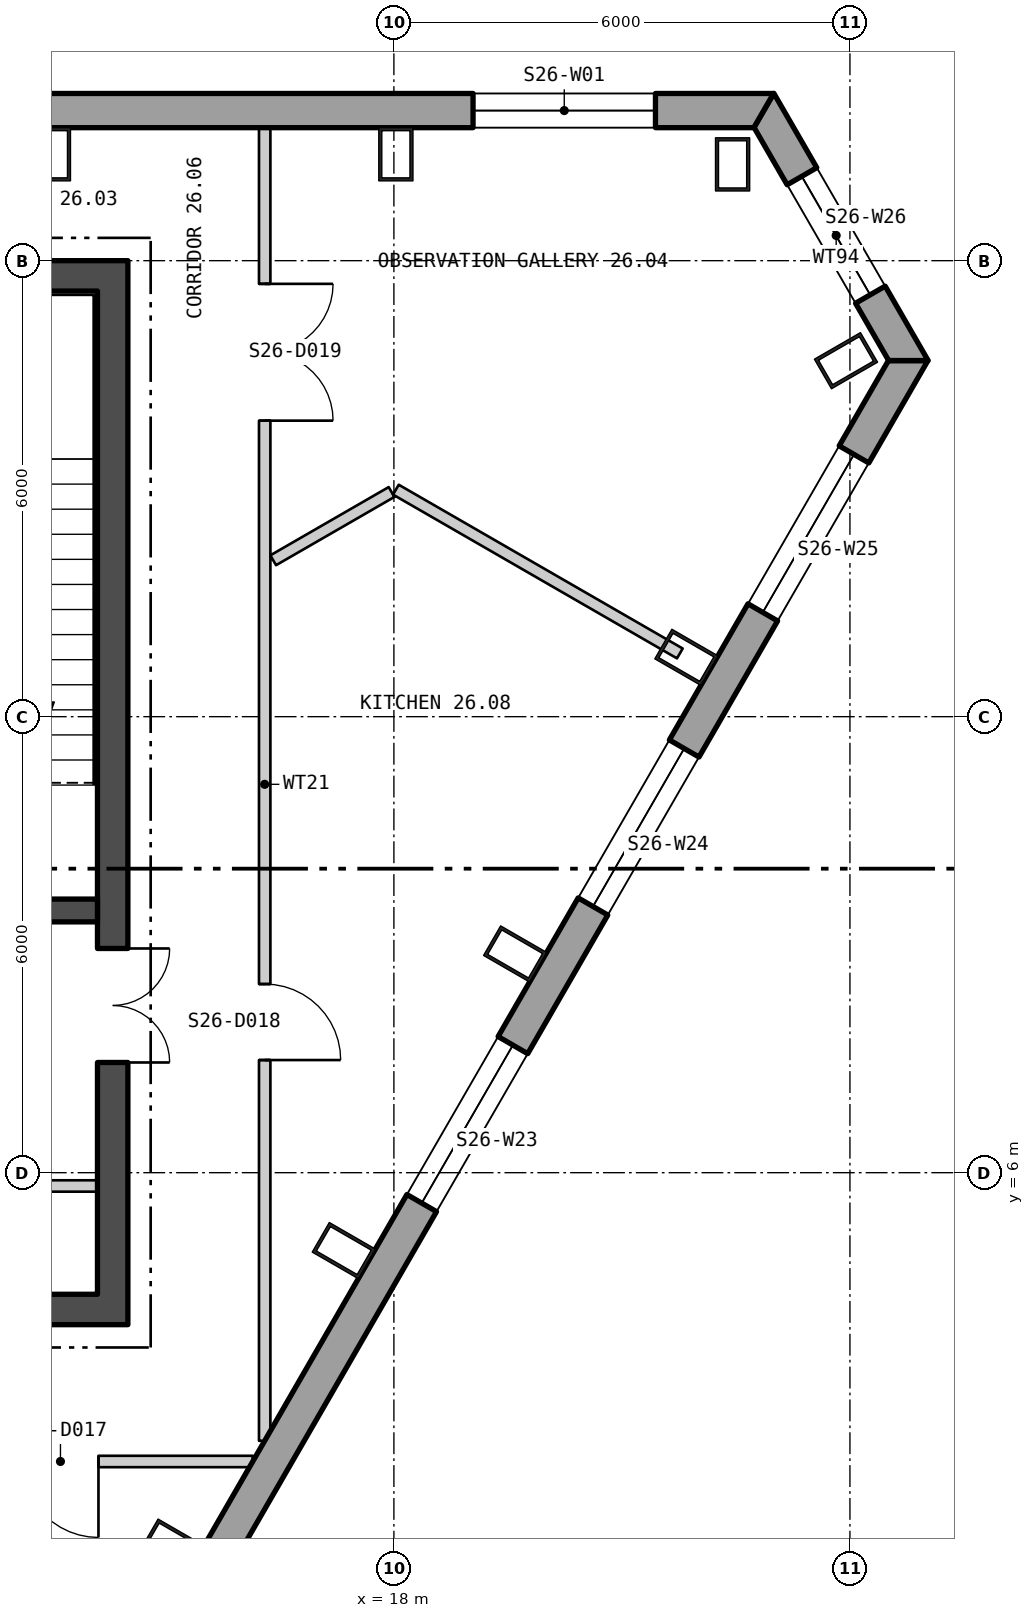
"""IFC4 building model, lengths in metres.
Left out: names, types, materials, properties, quantities, classifications, styles, units other than length and angle.
Written with IfcOpenShell. Run it as: python <this file> out.ifc"""

import sys

from ifc_helpers import new_model, si_unit, direction, frame, frame_2d, origin, origin_2d, place, context, subcontext, project, spatial, polyline, rectangle, hollow_rectangle, outline, extrude, element, fill, save


model = new_model("IFC4")
c1 = context("Model", 3, precision=1e-05, world=origin(), true_north=direction((0.0, 1.0)))
c2 = subcontext(c1, "Body", "Model", "MODEL_VIEW")
j1 = project(units=[si_unit("LENGTHUNIT", "METRE"), si_unit("PLANEANGLEUNIT", "RADIAN")], contexts=[c1])
p1 = place(None, origin())
s1 = spatial("IfcSite", under=j1, at=p1, CompositionType="ELEMENT")
p2 = place(p1, origin())
s2 = spatial("IfcBuilding", under=s1, at=p2, CompositionType="ELEMENT")
p3 = place(p2, frame((0.0, 0.0, 329.4)))
s3 = spatial("IfcBuildingStorey", under=s2, at=p3, CompositionType="ELEMENT", Elevation=329.4)
for number, where, z_axis, x_axis in (
    (1, (22.456, 19.267, 0.0), (0.0, 0.0, 1.0), (-1.0, 0.0, 0.0)),
    (2, (18.026, 19.4, 0.0), (0.0, 0.0, 1.0), (-1.0, 0.0, 0.0)),
    (3, (13.52, 19.4, 0.0), (0.0, 0.0, 1.0), (-1.0, 0.0, 0.0)),
    (4, (15.088, 1.073, 0.0), (0.0, 0.0, 1.0), (0.5, 0.866, 0.0)),
    (5, (17.341, 4.975, 0.0), (0.0, 0.0, 1.0), (0.5, 0.866, 0.0)),
    (6, (19.595, 8.878, 0.0), (0.0, 0.0, 1.0), (0.5, 0.866, 0.0)),
    (7, (21.848, 12.781, 0.0), (0.0, 0.0, 1.0), (0.5, 0.866, 0.0)),
    (8, (23.948, 16.684, 0.0), (0.0, 0.0, 1.0), (-0.5, 0.866, 0.0)),
):
    element("IfcColumn", number, at=place(p3, frame(where, z_axis=z_axis, x_axis=x_axis)), inside=s3, PredefinedType="COLUMN", context=c2, shape_type="SweptSolid", body=[
        extrude(hollow_rectangle(XDim=0.45, YDim=0.7, WallThickness=0.04, at=origin_2d()), origin(), (0.0, 0.0, 1.0), 4.2),
    ])
p4 = place(p3, frame((22.865, 19.975, -0.4), z_axis=(0.0, 0.0, 1.0), x_axis=(-1.0, 0.0, 0.0)))
e9 = element("IfcWall", 9, at=p4, inside=s3, PredefinedType="SOLIDWALL", context=c2, shape_type="SweptSolid", body=[
    extrude(outline(polyline([(-0.13, -0.225), (45.86, -0.225), (45.6, 0.225), (0.13, 0.225), (-0.13, -0.225)])), origin(), (0.0, 0.0, 1.0), 4.2),
])
p5 = place(p4, frame((1.424, 0.0, 1.3)))
e10 = element("IfcOpeningElement", 10, at=p5, cuts=e9, PredefinedType="OPENING", context=c2, shape_type="SweptSolid", body=[
    extrude(rectangle(XDim=2.4, YDim=2.3, at=frame_2d((1.2, 1.15))), frame((0.0, 0.235, 0.0), z_axis=(0.0, -1.0, 0.0), x_axis=(1.0, 0.0, 0.0)), (0.0, 0.0, 1.0), 0.47),
])
p6 = place(p4, frame((14.905, 0.0, 1.3)))
e11 = element("IfcOpeningElement", 11, at=p6, cuts=e9, PredefinedType="OPENING", context=c2, shape_type="SweptSolid", body=[
    extrude(rectangle(XDim=2.4, YDim=2.3, at=frame_2d((1.2, 1.15))), frame((0.0, 0.235, 0.0), z_axis=(0.0, -1.0, 0.0), x_axis=(1.0, 0.0, 0.0)), (0.0, 0.0, 1.0), 0.47),
])
p7 = place(p4, frame((19.412, 0.0, 1.3)))
e12 = element("IfcOpeningElement", 12, at=p7, cuts=e9, PredefinedType="OPENING", context=c2, shape_type="SweptSolid", body=[
    extrude(rectangle(XDim=2.4, YDim=2.3, at=frame_2d((1.2, 1.15))), frame((0.0, 0.235, 0.0), z_axis=(0.0, -1.0, 0.0), x_axis=(1.0, 0.0, 0.0)), (0.0, 0.0, 1.0), 0.47),
])
p8 = place(p4, frame((23.918, 0.0, 1.3)))
e13 = element("IfcOpeningElement", 13, at=p8, cuts=e9, PredefinedType="OPENING", context=c2, shape_type="SweptSolid", body=[
    extrude(rectangle(XDim=2.4, YDim=2.3, at=frame_2d((1.2, 1.15))), frame((0.0, 0.235, 0.0), z_axis=(0.0, -1.0, 0.0), x_axis=(1.0, 0.0, 0.0)), (0.0, 0.0, 1.0), 0.47),
])
p9 = place(p4, frame((28.425, 0.0, 1.3)))
e14 = element("IfcOpeningElement", 14, at=p9, cuts=e9, PredefinedType="OPENING", context=c2, shape_type="SweptSolid", body=[
    extrude(rectangle(XDim=2.4, YDim=2.3, at=frame_2d((1.2, 1.15))), frame((0.0, 0.235, 0.0), z_axis=(0.0, -1.0, 0.0), x_axis=(1.0, 0.0, 0.0)), (0.0, 0.0, 1.0), 0.47),
])
p10 = place(p4, frame((32.932, 0.0, 1.3)))
e15 = element("IfcOpeningElement", 15, at=p10, cuts=e9, PredefinedType="OPENING", context=c2, shape_type="SweptSolid", body=[
    extrude(rectangle(XDim=2.4, YDim=2.3, at=frame_2d((1.2, 1.15))), frame((0.0, 0.235, 0.0), z_axis=(0.0, -1.0, 0.0), x_axis=(1.0, 0.0, 0.0)), (0.0, 0.0, 1.0), 0.47),
])
p11 = place(p4, frame((41.907, 0.0, 1.3)))
e16 = element("IfcOpeningElement", 16, at=p11, cuts=e9, PredefinedType="OPENING", context=c2, shape_type="SweptSolid", body=[
    extrude(rectangle(XDim=2.4, YDim=2.3, at=frame_2d((1.2, 1.15))), frame((0.0, 0.235, 0.0), z_axis=(0.0, -1.0, 0.0), x_axis=(1.0, 0.0, 0.0)), (0.0, 0.0, 1.0), 0.47),
])
p12 = place(p3, frame((1.9, -22.92, -0.18), z_axis=(0.0, 0.0, 1.0), x_axis=(0.500000141277, 0.866025322218, 0.0)))
e17 = element("IfcWall", 17, at=p12, inside=s3, PredefinedType="SOLIDWALL", context=c2, shape_type="SweptSolid", body=[
    extrude(outline(polyline([(-0.13, -0.225), (45.86, -0.225), (45.6, 0.225), (0.13, 0.225), (-0.13, -0.225)])), origin(), (0.0, 0.0, 1.0), 3.98),
])
p13 = place(p12, frame((1.424, 0.0, 1.08)))
e18 = element("IfcOpeningElement", 18, at=p13, cuts=e17, PredefinedType="OPENING", context=c2, shape_type="SweptSolid", body=[
    extrude(rectangle(XDim=2.4, YDim=2.3, at=frame_2d((1.2, 1.15))), frame((0.0, 0.235, 0.0), z_axis=(0.0, -1.0, 0.0), x_axis=(1.0, 0.0, 0.0)), (0.0, 0.0, 1.0), 0.47),
])
p14 = place(p12, frame((5.892, 0.0, 1.08)))
e19 = element("IfcOpeningElement", 19, at=p14, cuts=e17, PredefinedType="OPENING", context=c2, shape_type="SweptSolid", body=[
    extrude(rectangle(XDim=2.4, YDim=2.3, at=frame_2d((1.2, 1.15))), frame((0.0, 0.235, 0.0), z_axis=(0.0, -1.0, 0.0), x_axis=(1.0, 0.0, 0.0)), (0.0, 0.0, 1.0), 0.47),
])
p15 = place(p12, frame((14.905, 0.0, 1.08)))
e20 = element("IfcOpeningElement", 20, at=p15, cuts=e17, PredefinedType="OPENING", context=c2, shape_type="SweptSolid", body=[
    extrude(rectangle(XDim=2.4, YDim=2.3, at=frame_2d((1.2, 1.15))), frame((0.0, 0.235, 0.0), z_axis=(0.0, -1.0, 0.0), x_axis=(1.0, 0.0, 0.0)), (0.0, 0.0, 1.0), 0.47),
])
p16 = place(p12, frame((19.412, 0.0, 1.08)))
e21 = element("IfcOpeningElement", 21, at=p16, cuts=e17, PredefinedType="OPENING", context=c2, shape_type="SweptSolid", body=[
    extrude(rectangle(XDim=2.4, YDim=2.3, at=frame_2d((1.2, 1.15))), frame((0.0, 0.235, 0.0), z_axis=(0.0, -1.0, 0.0), x_axis=(1.0, 0.0, 0.0)), (0.0, 0.0, 1.0), 0.47),
])
p17 = place(p12, frame((23.918, 0.0, 1.08)))
e22 = element("IfcOpeningElement", 22, at=p17, cuts=e17, PredefinedType="OPENING", context=c2, shape_type="SweptSolid", body=[
    extrude(rectangle(XDim=2.4, YDim=2.3, at=frame_2d((1.2, 1.15))), frame((0.0, 0.235, 0.0), z_axis=(0.0, -1.0, 0.0), x_axis=(1.0, 0.0, 0.0)), (0.0, 0.0, 1.0), 0.47),
])
p18 = place(p12, frame((32.932, 0.0, 1.08)))
e23 = element("IfcOpeningElement", 23, at=p18, cuts=e17, PredefinedType="OPENING", context=c2, shape_type="SweptSolid", body=[
    extrude(rectangle(XDim=2.4, YDim=2.3, at=frame_2d((1.2, 1.15))), frame((0.0, 0.235, 0.0), z_axis=(0.0, -1.0, 0.0), x_axis=(1.0, 0.0, 0.0)), (0.0, 0.0, 1.0), 0.47),
])
p19 = place(p12, frame((37.438, 0.0, 1.08)))
e24 = element("IfcOpeningElement", 24, at=p19, cuts=e17, PredefinedType="OPENING", context=c2, shape_type="SweptSolid", body=[
    extrude(rectangle(XDim=2.4, YDim=2.3, at=frame_2d((1.2, 1.15))), frame((0.0, 0.235, 0.0), z_axis=(0.0, -1.0, 0.0), x_axis=(1.0, 0.0, 0.0)), (0.0, 0.0, 1.0), 0.47),
])
p20 = place(p12, frame((41.907, 0.0, 1.08)))
e25 = element("IfcOpeningElement", 25, at=p20, cuts=e17, PredefinedType="OPENING", context=c2, shape_type="SweptSolid", body=[
    extrude(rectangle(XDim=2.4, YDim=2.3, at=frame_2d((1.2, 1.15))), frame((0.0, 0.235, 0.0), z_axis=(0.0, -1.0, 0.0), x_axis=(1.0, 0.0, 0.0)), (0.0, 0.0, 1.0), 0.47),
])
p21 = place(p3, frame((24.769, 16.686, -0.4), z_axis=(0.0, 0.0, 1.0), x_axis=(-0.499996551991, 0.866027394484, 0.0)))
e26 = element("IfcWall", 26, at=p21, inside=s3, PredefinedType="SOLIDWALL", context=c2, shape_type="SweptSolid", body=[
    extrude(outline(polyline([(-0.13, -0.225), (3.93, -0.225), (3.67, 0.225), (0.13, 0.225), (-0.13, -0.225)])), origin(), (0.0, 0.0, 1.0), 4.2),
])
p22 = place(p21, frame((1.0, 0.0, 1.3)))
e27 = element("IfcOpeningElement", 27, at=p22, cuts=e26, PredefinedType="OPENING", context=c2, shape_type="SweptSolid", body=[
    extrude(rectangle(XDim=1.8, YDim=2.3, at=frame_2d((0.9, 1.15))), frame((0.0, 0.235, 0.0), z_axis=(0.0, -1.0, 0.0), x_axis=(1.0, 0.0, 0.0)), (0.0, 0.0, 1.0), 0.47),
])
p23 = place(p3, frame((-14.5, 4.2, 0.0), z_axis=(0.0, 0.0, 1.0), x_axis=(1.0, 0.0, 0.0)))
e28 = element("IfcWall", 28, at=p23, inside=s3, PredefinedType="SHEAR", context=c2, shape_type="SweptSolid", body=[
    extrude(rectangle(XDim=29.0, YDim=0.4, at=frame_2d((14.5, 0.0))), origin(), (0.0, 0.0, 1.0), 4.0),
])
p24 = place(p23, frame((9.0, 0.0, 0.0)))
e29 = element("IfcOpeningElement", 29, at=p24, cuts=e28, PredefinedType="OPENING", context=c2, shape_type="SweptSolid", body=[
    extrude(rectangle(XDim=1.8, YDim=2.4, at=frame_2d((0.9, 1.2))), frame((0.0, 0.21, 0.0), z_axis=(0.0, -1.0, 0.0), x_axis=(1.0, 0.0, 0.0)), (0.0, 0.0, 1.0), 0.42),
])
p25 = place(p23, frame((19.0, 0.0, 0.0)))
e30 = element("IfcOpeningElement", 30, at=p25, cuts=e28, PredefinedType="OPENING", context=c2, shape_type="SweptSolid", body=[
    extrude(rectangle(XDim=1.8, YDim=2.4, at=frame_2d((0.9, 1.2))), frame((0.0, 0.21, 0.0), z_axis=(0.0, -1.0, 0.0), x_axis=(1.0, 0.0, 0.0)), (0.0, 0.0, 1.0), 0.42),
])
p26 = place(p3, frame((-14.5, 17.8, 0.0), z_axis=(0.0, 0.0, 1.0), x_axis=(1.0, 0.0, 0.0)))
e31 = element("IfcWall", 31, at=p26, inside=s3, PredefinedType="SHEAR", context=c2, shape_type="SweptSolid", body=[
    extrude(rectangle(XDim=29.0, YDim=0.4, at=frame_2d((14.5, 0.0))), origin(), (0.0, 0.0, 1.0), 4.0),
])
p27 = place(p3, frame((14.3, 4.4, 0.0), z_axis=(0.0, 0.0, 1.0), x_axis=(0.0, 1.0, 0.0)))
e32 = element("IfcWall", 32, at=p27, inside=s3, PredefinedType="SHEAR", context=c2, shape_type="SweptSolid", body=[
    extrude(rectangle(XDim=13.2, YDim=0.4, at=frame_2d((6.6, 0.0))), origin(), (0.0, 0.0, 1.0), 4.0),
])
p28 = place(p27, frame((3.05, 0.0, 0.0)))
e33 = element("IfcOpeningElement", 33, at=p28, cuts=e32, PredefinedType="OPENING", context=c2, shape_type="SweptSolid", body=[
    extrude(rectangle(XDim=1.5, YDim=2.1, at=frame_2d((0.75, 1.05))), frame((0.0, 0.21, 0.0), z_axis=(0.0, -1.0, 0.0), x_axis=(1.0, 0.0, 0.0)), (0.0, 0.0, 1.0), 0.42),
])
p29 = place(p3, frame((11.0, 9.45, 0.0), z_axis=(0.0, 0.0, 1.0), x_axis=(1.0, 0.0, 0.0)))
e34 = element("IfcWall", 34, at=p29, inside=s3, PredefinedType="SHEAR", context=c2, shape_type="SweptSolid", body=[
    extrude(rectangle(XDim=3.1, YDim=0.3, at=frame_2d((1.55, 0.0))), origin(), (0.0, 0.0, 1.0), 4.0),
])
p30 = place(p29, frame((0.95, 0.0, 0.0)))
e35 = element("IfcOpeningElement", 35, at=p30, cuts=e34, PredefinedType="OPENING", context=c2, shape_type="SweptSolid", body=[
    extrude(rectangle(XDim=1.2, YDim=2.1, at=frame_2d((0.6, 1.05))), frame((0.0, 0.16, 0.0), z_axis=(0.0, -1.0, 0.0), x_axis=(1.0, 0.0, 0.0)), (0.0, 0.0, 1.0), 0.32),
])
p31 = place(p3, frame((11.0, 5.825, 0.0), z_axis=(0.0, 0.0, 1.0), x_axis=(1.0, 0.0, 0.0)))
e36 = element("IfcWall", 36, at=p31, inside=s3, PredefinedType="PARTITIONING", context=c2, shape_type="SweptSolid", body=[
    extrude(rectangle(XDim=3.1, YDim=0.15, at=frame_2d((1.55, 0.0))), origin(), (0.0, 0.0, 1.0), 4.0),
])
p32 = place(p3, frame((7.485, 2.2, 0.0), z_axis=(0.0, 0.0, 1.0), x_axis=(1.0, 0.0, 0.0)))
e37 = element("IfcWall", 37, at=p32, inside=s3, PredefinedType="PARTITIONING", context=c2, shape_type="SweptSolid", body=[
    extrude(rectangle(XDim=8.658, YDim=0.15, at=frame_2d((4.329, 0.0))), origin(), (0.0, 0.0, 1.0), 4.0),
])
p33 = place(p32, frame((0.921, 0.0, 0.0)))
e38 = element("IfcOpeningElement", 38, at=p33, cuts=e37, PredefinedType="OPENING", context=c2, shape_type="SweptSolid", body=[
    extrude(rectangle(XDim=1.0, YDim=2.1, at=frame_2d((0.5, 1.05))), frame((0.0, 0.085, 0.0), z_axis=(0.0, -1.0, 0.0), x_axis=(1.0, 0.0, 0.0)), (0.0, 0.0, 1.0), 0.17),
])
p34 = place(p32, frame((3.581, 0.0, 0.0)))
e39 = element("IfcOpeningElement", 39, at=p34, cuts=e37, PredefinedType="OPENING", context=c2, shape_type="SweptSolid", body=[
    extrude(rectangle(XDim=1.0, YDim=2.1, at=frame_2d((0.5, 1.05))), frame((0.0, 0.085, 0.0), z_axis=(0.0, -1.0, 0.0), x_axis=(1.0, 0.0, 0.0)), (0.0, 0.0, 1.0), 0.17),
])
p35 = place(p32, frame((5.628, 0.0, 0.0)))
e40 = element("IfcOpeningElement", 40, at=p35, cuts=e37, PredefinedType="OPENING", context=c2, shape_type="SweptSolid", body=[
    extrude(rectangle(XDim=1.0, YDim=2.1, at=frame_2d((0.5, 1.05))), frame((0.0, 0.085, 0.0), z_axis=(0.0, -1.0, 0.0), x_axis=(1.0, 0.0, 0.0)), (0.0, 0.0, 1.0), 0.17),
])
p36 = place(p3, frame((16.3, 2.472, 0.0), z_axis=(0.0, 0.0, 1.0), x_axis=(0.0, 1.0, 0.0)))
e41 = element("IfcWall", 41, at=p36, inside=s3, PredefinedType="PARTITIONING", context=c2, shape_type="SweptSolid", body=[
    extrude(rectangle(XDim=17.276, YDim=0.15, at=frame_2d((8.638, 0.0))), origin(), (0.0, 0.0, 1.0), 4.0),
])
p37 = place(p36, frame((5.01, 0.0, 0.0)))
e42 = element("IfcOpeningElement", 42, at=p37, cuts=e41, PredefinedType="OPENING", context=c2, shape_type="SweptSolid", body=[
    extrude(rectangle(XDim=1.0, YDim=2.1, at=frame_2d((0.5, 1.05))), frame((0.0, 0.085, 0.0), z_axis=(0.0, -1.0, 0.0), x_axis=(1.0, 0.0, 0.0)), (0.0, 0.0, 1.0), 0.17),
])
p38 = place(p36, frame((13.423, 0.0, 0.0)))
e43 = element("IfcOpeningElement", 43, at=p38, cuts=e41, PredefinedType="OPENING", context=c2, shape_type="SweptSolid", body=[
    extrude(rectangle(XDim=1.8, YDim=2.1, at=frame_2d((0.9, 1.05))), frame((0.0, 0.085, 0.0), z_axis=(0.0, -1.0, 0.0), x_axis=(1.0, 0.0, 0.0)), (0.0, 0.0, 1.0), 0.17),
])
p39 = place(p3, frame((16.412, 14.058, 0.0), z_axis=(0.0, 0.0, 1.0), x_axis=(0.866250415226, 0.499610066072, 0.0)))
e44 = element("IfcWall", 44, at=p39, inside=s3, PredefinedType="PARTITIONING", context=c2, shape_type="SweptSolid", body=[
    extrude(rectangle(XDim=1.797, YDim=0.15, at=frame_2d((0.899, 0.0))), origin(), (0.0, 0.0, 1.0), 4.0),
])
p40 = place(p3, frame((18.026, 14.987, 0.0), z_axis=(0.0, 0.0, 1.0), x_axis=(0.866224183696, -0.499655544932, 0.0)))
e45 = element("IfcWall", 45, at=p40, inside=s3, PredefinedType="PARTITIONING", context=c2, shape_type="SweptSolid", body=[
    extrude(rectangle(XDim=4.313, YDim=0.15, at=frame_2d((2.156, 0.0))), origin(), (0.0, 0.0, 1.0), 4.0),
])
p41 = place(p5, origin())
e46 = element("IfcWindow", 46, at=p41, inside=s3, PartitioningType="SINGLE_PANEL", PredefinedType="WINDOW", context=c2, shape_type="SweptSolid", body=[
    extrude(rectangle(XDim=2.4, YDim=2.3, at=frame_2d((1.2, 1.15))), frame((0.0, 0.105, 0.0), z_axis=(0.0, -1.0, 0.0), x_axis=(1.0, 0.0, 0.0)), (0.0, 0.0, 1.0), 0.06),
])
fill(e10, e46)
p42 = place(p18, origin())
e47 = element("IfcWindow", 47, at=p42, inside=s3, PartitioningType="SINGLE_PANEL", PredefinedType="WINDOW", context=c2, shape_type="SweptSolid", body=[
    extrude(rectangle(XDim=2.4, YDim=2.3, at=frame_2d((1.2, 1.15))), frame((0.0, 0.105, 0.0), z_axis=(0.0, -1.0, 0.0), x_axis=(1.0, 0.0, 0.0)), (0.0, 0.0, 1.0), 0.06),
])
fill(e23, e47)
p43 = place(p19, origin())
e48 = element("IfcWindow", 48, at=p43, inside=s3, PartitioningType="SINGLE_PANEL", PredefinedType="WINDOW", context=c2, shape_type="SweptSolid", body=[
    extrude(rectangle(XDim=2.4, YDim=2.3, at=frame_2d((1.2, 1.15))), frame((0.0, 0.105, 0.0), z_axis=(0.0, -1.0, 0.0), x_axis=(1.0, 0.0, 0.0)), (0.0, 0.0, 1.0), 0.06),
])
fill(e24, e48)
p44 = place(p20, origin())
e49 = element("IfcWindow", 49, at=p44, inside=s3, PartitioningType="SINGLE_PANEL", PredefinedType="WINDOW", context=c2, shape_type="SweptSolid", body=[
    extrude(rectangle(XDim=2.4, YDim=2.3, at=frame_2d((1.2, 1.15))), frame((0.0, 0.105, 0.0), z_axis=(0.0, -1.0, 0.0), x_axis=(1.0, 0.0, 0.0)), (0.0, 0.0, 1.0), 0.06),
])
fill(e25, e49)
p45 = place(p22, origin())
e50 = element("IfcWindow", 50, at=p45, inside=s3, PartitioningType="SINGLE_PANEL", PredefinedType="WINDOW", context=c2, shape_type="SweptSolid", body=[
    extrude(rectangle(XDim=1.8, YDim=2.3, at=frame_2d((0.9, 1.15))), frame((0.0, 0.105, 0.0), z_axis=(0.0, -1.0, 0.0), x_axis=(1.0, 0.0, 0.0)), (0.0, 0.0, 1.0), 0.06),
])
fill(e27, e50)
p46 = place(p28, origin())
e51 = element("IfcDoor", 51, at=p46, inside=s3, OperationType="DOUBLE_DOOR_SINGLE_SWING", PredefinedType="DOOR", context=c2, shape_type="SweptSolid", body=[
    extrude(rectangle(XDim=1.5, YDim=2.1, at=frame_2d((0.75, 1.05))), frame((0.0, 0.025, 0.0), z_axis=(0.0, -1.0, 0.0), x_axis=(1.0, 0.0, 0.0)), (0.0, 0.0, 1.0), 0.05),
])
fill(e33, e51)
p47 = place(p35, origin())
e52 = element("IfcDoor", 52, at=p47, inside=s3, OperationType="SINGLE_SWING_RIGHT", PredefinedType="DOOR", context=c2, shape_type="SweptSolid", body=[
    extrude(rectangle(XDim=1.0, YDim=2.1, at=frame_2d((0.5, 1.05))), frame((0.0, 0.025, 0.0), z_axis=(0.0, -1.0, 0.0), x_axis=(1.0, 0.0, 0.0)), (0.0, 0.0, 1.0), 0.05),
])
fill(e40, e52)
p48 = place(p37, origin())
e53 = element("IfcDoor", 53, at=p48, inside=s3, OperationType="SINGLE_SWING_LEFT", PredefinedType="DOOR", context=c2, shape_type="SweptSolid", body=[
    extrude(rectangle(XDim=1.0, YDim=2.1, at=frame_2d((0.5, 1.05))), frame((0.0, 0.025, 0.0), z_axis=(0.0, -1.0, 0.0), x_axis=(1.0, 0.0, 0.0)), (0.0, 0.0, 1.0), 0.05),
])
fill(e42, e53)
p49 = place(p38, origin())
e54 = element("IfcDoor", 54, at=p49, inside=s3, OperationType="DOUBLE_DOOR_SINGLE_SWING", PredefinedType="DOOR", context=c2, shape_type="SweptSolid", body=[
    extrude(rectangle(XDim=1.8, YDim=2.1, at=frame_2d((0.9, 1.05))), frame((0.0, 0.025, 0.0), z_axis=(0.0, -1.0, 0.0), x_axis=(1.0, 0.0, 0.0)), (0.0, 0.0, 1.0), 0.05),
])
fill(e43, e54)
save(model, sys.argv[1])
